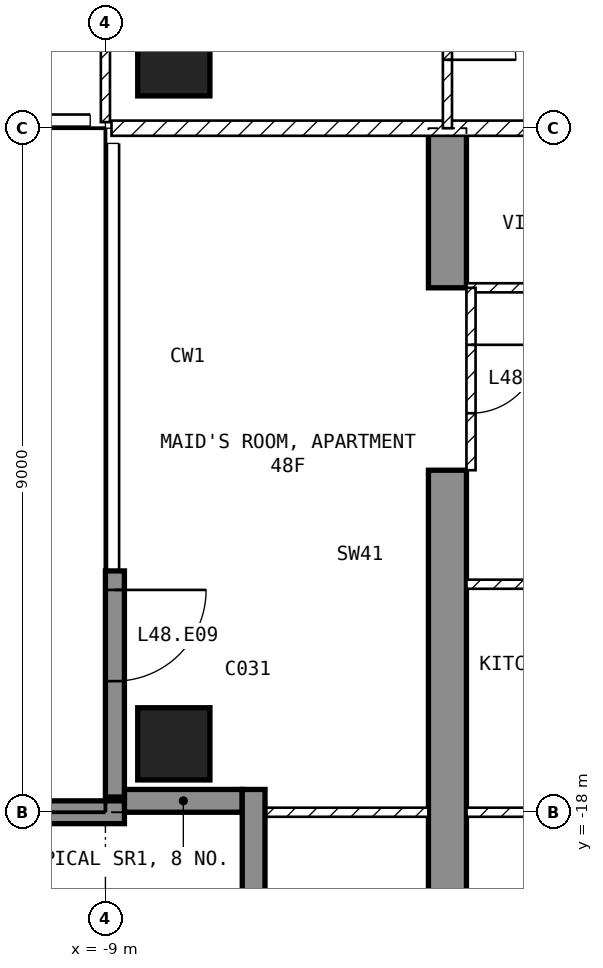
"""IFC4 building model, lengths in metres.
Left out: names, types, materials, properties, quantities, classifications, styles, units other than length and angle.
Written with IfcOpenShell. Run it as: python <this file> out.ifc"""

import sys

from ifc_helpers import new_model, si_unit, direction, frame, frame_2d, origin, origin_2d, place, context, subcontext, project, spatial, polyline, rectangle, outline, extrude, element, fill, save


model = new_model("IFC4")
c1 = context("Model", 3, precision=1e-05, world=origin(), true_north=direction((0.0, 1.0)))
c2 = subcontext(c1, "Body", "Model", "MODEL_VIEW")
j1 = project(units=[si_unit("LENGTHUNIT", "METRE"), si_unit("PLANEANGLEUNIT", "RADIAN")], contexts=[c1])
p1 = place(None, origin())
s1 = spatial("IfcSite", under=j1, at=p1, CompositionType="ELEMENT")
p2 = place(p1, origin())
s2 = spatial("IfcBuilding", under=s1, at=p2, CompositionType="ELEMENT")
p3 = place(p2, frame((0.0, 0.0, 194.6)))
s3 = spatial("IfcBuildingStorey", under=s2, at=p3, CompositionType="ELEMENT", Elevation=194.6)
for number, where, z_axis, x_axis in (
    (1, (-8.1, -17.1, -0.25), (0.0, 0.0, 1.0), (1.0, 0.0, 0.0)),
    (2, (-8.1, -8.1, -0.25), (0.0, 0.0, 1.0), (1.0, 0.0, 0.0)),
):
    element("IfcColumn", number, at=place(p3, frame(where, z_axis=z_axis, x_axis=x_axis)), inside=s3, PredefinedType="COLUMN", context=c2, shape_type="SweptSolid", body=[
        extrude(rectangle(XDim=0.95, YDim=0.95, at=origin_2d()), origin(), (0.0, 0.0, 1.0), 3.5),
    ])
p4 = place(p3, frame((-4.75, -20.225, -0.25), z_axis=(1.0, 0.0, 0.0), x_axis=(0.0, 1.0, 0.0)))
e3 = element("IfcWall", 3, at=p4, inside=s3, PredefinedType="SHEAR", context=c2, shape_type="SweptSolid", body=[
    extrude(outline(polyline([(0.0, 0.0), (6.725, 0.0), (6.725, 2.65), (9.125, 2.65), (9.125, 0.0), (11.225, 0.0), (11.225, 3.5), (0.0, 3.5), (0.0, 0.0)])), origin(), (0.0, 0.0, 1.0), 0.5),
])
p5 = place(p3, frame((-8.875, -14.825, 0.0), z_axis=(0.0, 0.0, 1.0), x_axis=(0.0, -1.0, 0.0)))
e4 = element("IfcWall", 4, at=p5, inside=s3, PredefinedType="SOLIDWALL", context=c2, shape_type="SweptSolid", body=[
    extrude(rectangle(XDim=2.975, YDim=0.25, at=frame_2d((1.488, 0.0))), origin(), (0.0, 0.0, 1.0), 3.25),
])
p6 = place(p5, frame((0.25, 0.0, 0.0)))
e5 = element("IfcOpeningElement", 5, at=p6, cuts=e4, PredefinedType="OPENING", context=c2, shape_type="SweptSolid", body=[
    extrude(rectangle(XDim=1.2, YDim=2.4, at=frame_2d((0.6, 1.2))), frame((0.0, 0.135, 0.0), z_axis=(0.0, -1.0, 0.0), x_axis=(1.0, 0.0, 0.0)), (0.0, 0.0, 1.0), 0.27),
])
p7 = place(p3, frame((-8.75, -17.85, 0.0), z_axis=(0.0, 0.0, 1.0), x_axis=(1.0, 0.0, 0.0)))
e6 = element("IfcWall", 6, at=p7, inside=s3, PredefinedType="SOLIDWALL", context=c2, shape_type="SweptSolid", body=[
    extrude(rectangle(XDim=1.55, YDim=0.3, at=frame_2d((0.775, 0.0))), origin(), (0.0, 0.0, 1.0), 3.25),
])
p8 = place(p3, frame((-7.05, -17.7, 0.0), z_axis=(0.0, 0.0, 1.0), x_axis=(0.0, -1.0, 0.0)))
e7 = element("IfcWall", 7, at=p8, inside=s3, PredefinedType="SOLIDWALL", context=c2, shape_type="SweptSolid", body=[
    extrude(rectangle(XDim=1.8, YDim=0.3, at=frame_2d((0.9, 0.0))), origin(), (0.0, 0.0, 1.0), 3.25),
])
p9 = place(p3, frame((-8.75, -18.0, 0.0), z_axis=(0.0, 0.0, 1.0), x_axis=(-1.0, 0.0, 0.0)))
e8 = element("IfcWall", 8, at=p9, inside=s3, PredefinedType="SOLIDWALL", context=c2, shape_type="SweptSolid", body=[
    extrude(rectangle(XDim=2.95, YDim=0.3, at=frame_2d((1.475, 0.0))), origin(), (0.0, 0.0, 1.0), 3.25),
])
p10 = place(p3, frame((8.92, -9.0, 0.0), z_axis=(0.0, 0.0, 1.0), x_axis=(-1.0, 0.0, 0.0)))
e9 = element("IfcWall", 9, at=p10, inside=s3, PredefinedType="PARTITIONING", context=c2, shape_type="SweptSolid", body=[
    extrude(rectangle(XDim=17.84, YDim=0.2, at=frame_2d((8.92, 0.0))), origin(), (0.0, 0.0, 1.0), 3.25),
])
p11 = place(p10, frame((8.42, 0.0, 0.0)))
e10 = element("IfcOpeningElement", 10, at=p11, cuts=e9, PredefinedType="OPENING", context=c2, shape_type="SweptSolid", body=[
    extrude(rectangle(XDim=1.0, YDim=2.1, at=frame_2d((0.5, 1.05))), frame((0.0, 0.11, 0.0), z_axis=(0.0, -1.0, 0.0), x_axis=(1.0, 0.0, 0.0)), (0.0, 0.0, 1.0), 0.22),
])
p12 = place(p3, frame((-9.0, -1.3, 0.0), z_axis=(0.0, 0.0, 1.0), x_axis=(0.0, -1.0, 0.0)))
e11 = element("IfcWall", 11, at=p12, inside=s3, PredefinedType="PARTITIONING", context=c2, shape_type="SweptSolid", body=[
    extrude(rectangle(XDim=7.62, YDim=0.12, at=frame_2d((3.81, 0.0))), origin(), (0.0, 0.0, 1.0), 3.25),
])
p13 = place(p12, frame((1.15, 0.0, 0.0)))
e12 = element("IfcOpeningElement", 12, at=p13, cuts=e11, PredefinedType="OPENING", context=c2, shape_type="SweptSolid", body=[
    extrude(rectangle(XDim=0.9, YDim=2.1, at=frame_2d((0.45, 1.05))), frame((0.0, 0.07, 0.0), z_axis=(0.0, -1.0, 0.0), x_axis=(1.0, 0.0, 0.0)), (0.0, 0.0, 1.0), 0.14),
])
p14 = place(p3, frame((-4.5, -6.3, 0.0), z_axis=(0.0, 0.0, 1.0), x_axis=(0.0, -1.0, 0.0)))
e13 = element("IfcWall", 13, at=p14, inside=s3, PredefinedType="PARTITIONING", context=c2, shape_type="SweptSolid", body=[
    extrude(rectangle(XDim=2.7, YDim=0.12, at=frame_2d((1.35, 0.0))), origin(), (0.0, 0.0, 1.0), 3.25),
])
p15 = place(p14, frame((0.9, 0.0, 0.0)))
e14 = element("IfcOpeningElement", 14, at=p15, cuts=e13, PredefinedType="OPENING", context=c2, shape_type="SweptSolid", body=[
    extrude(rectangle(XDim=0.9, YDim=2.1, at=frame_2d((0.45, 1.05))), frame((0.0, 0.07, 0.0), z_axis=(0.0, -1.0, 0.0), x_axis=(1.0, 0.0, 0.0)), (0.0, 0.0, 1.0), 0.14),
])
p16 = place(p3, frame((2.1, -11.1, 0.0), z_axis=(0.0, 0.0, 1.0), x_axis=(-1.0, 0.0, 0.0)))
e15 = element("IfcWall", 15, at=p16, inside=s3, PredefinedType="PARTITIONING", context=c2, shape_type="SweptSolid", body=[
    extrude(rectangle(XDim=6.35, YDim=0.12, at=frame_2d((3.175, 0.0))), origin(), (0.0, 0.0, 1.0), 3.25),
])
p17 = place(p16, frame((2.725, 0.0, 0.0)))
e16 = element("IfcOpeningElement", 16, at=p17, cuts=e15, PredefinedType="OPENING", context=c2, shape_type="SweptSolid", body=[
    extrude(rectangle(XDim=0.9, YDim=2.1, at=frame_2d((0.45, 1.05))), frame((0.0, 0.07, 0.0), z_axis=(0.0, -1.0, 0.0), x_axis=(1.0, 0.0, 0.0)), (0.0, 0.0, 1.0), 0.14),
])
p18 = place(p3, frame((-0.44, -15.0, 0.0), z_axis=(0.0, 0.0, 1.0), x_axis=(-1.0, 0.0, 0.0)))
e17 = element("IfcWall", 17, at=p18, inside=s3, PredefinedType="PARTITIONING", context=c2, shape_type="SweptSolid", body=[
    extrude(rectangle(XDim=3.81, YDim=0.12, at=frame_2d((1.905, 0.0))), origin(), (0.0, 0.0, 1.0), 3.25),
])
p19 = place(p3, frame((4.25, -18.0, 0.0), z_axis=(0.0, 0.0, 1.0), x_axis=(-1.0, 0.0, 0.0)))
e18 = element("IfcWall", 18, at=p19, inside=s3, PredefinedType="PARTITIONING", context=c2, shape_type="SweptSolid", body=[
    extrude(rectangle(XDim=8.5, YDim=0.12, at=frame_2d((4.25, 0.0))), origin(), (0.0, 0.0, 1.0), 3.25),
])
p20 = place(p19, frame((1.925, 0.0, 0.0)))
e19 = element("IfcOpeningElement", 19, at=p20, cuts=e18, PredefinedType="OPENING", context=c2, shape_type="SweptSolid", body=[
    extrude(rectangle(XDim=0.9, YDim=2.1, at=frame_2d((0.45, 1.05))), frame((0.0, 0.07, 0.0), z_axis=(0.0, -1.0, 0.0), x_axis=(1.0, 0.0, 0.0)), (0.0, 0.0, 1.0), 0.14),
])
p21 = place(p3, frame((-4.75, -18.0, 0.0), z_axis=(0.0, 0.0, 1.0), x_axis=(-1.0, 0.0, 0.0)))
e20 = element("IfcWall", 20, at=p21, inside=s3, PredefinedType="PARTITIONING", context=c2, shape_type="SweptSolid", body=[
    extrude(rectangle(XDim=2.37, YDim=0.12, at=frame_2d((1.185, 0.0))), origin(), (0.0, 0.0, 1.0), 3.25),
])
p22 = place(p3, frame((-4.19, -11.1, 0.0), z_axis=(0.0, 0.0, 1.0), x_axis=(0.0, -1.0, 0.0)))
e21 = element("IfcWall", 21, at=p22, inside=s3, PredefinedType="PARTITIONING", context=c2, shape_type="SweptSolid", body=[
    extrude(rectangle(XDim=2.4, YDim=0.12, at=frame_2d((1.2, 0.0))), origin(), (0.0, 0.0, 1.0), 2.4),
])
p23 = place(p22, frame((0.75, 0.0, 0.0)))
e22 = element("IfcOpeningElement", 22, at=p23, cuts=e21, PredefinedType="OPENING", context=c2, shape_type="SweptSolid", body=[
    extrude(rectangle(XDim=0.9, YDim=2.1, at=frame_2d((0.45, 1.05))), frame((0.0, 0.07, 0.0), z_axis=(0.0, -1.0, 0.0), x_axis=(1.0, 0.0, 0.0)), (0.0, 0.0, 1.0), 0.14),
])
p24 = place(p6, origin())
e23 = element("IfcDoor", 23, at=p24, inside=s3, OperationType="SINGLE_SWING_LEFT", PredefinedType="DOOR", context=c2, shape_type="SweptSolid", body=[
    extrude(rectangle(XDim=1.2, YDim=2.4, at=frame_2d((0.6, 1.2))), frame((0.0, 0.025, 0.0), z_axis=(0.0, -1.0, 0.0), x_axis=(1.0, 0.0, 0.0)), (0.0, 0.0, 1.0), 0.05),
])
fill(e5, e23)
p25 = place(p15, origin())
e24 = element("IfcDoor", 24, at=p25, inside=s3, OperationType="SINGLE_SWING_RIGHT", PredefinedType="DOOR", context=c2, shape_type="SweptSolid", body=[
    extrude(rectangle(XDim=0.9, YDim=2.1, at=frame_2d((0.45, 1.05))), frame((0.0, 0.025, 0.0), z_axis=(0.0, -1.0, 0.0), x_axis=(1.0, 0.0, 0.0)), (0.0, 0.0, 1.0), 0.05),
])
fill(e14, e24)
p26 = place(p23, origin())
e25 = element("IfcDoor", 25, at=p26, inside=s3, OperationType="SINGLE_SWING_LEFT", PredefinedType="DOOR", context=c2, shape_type="SweptSolid", body=[
    extrude(rectangle(XDim=0.9, YDim=2.1, at=frame_2d((0.45, 1.05))), frame((0.0, 0.025, 0.0), z_axis=(0.0, -1.0, 0.0), x_axis=(1.0, 0.0, 0.0)), (0.0, 0.0, 1.0), 0.05),
])
fill(e22, e25)
save(model, sys.argv[1])
